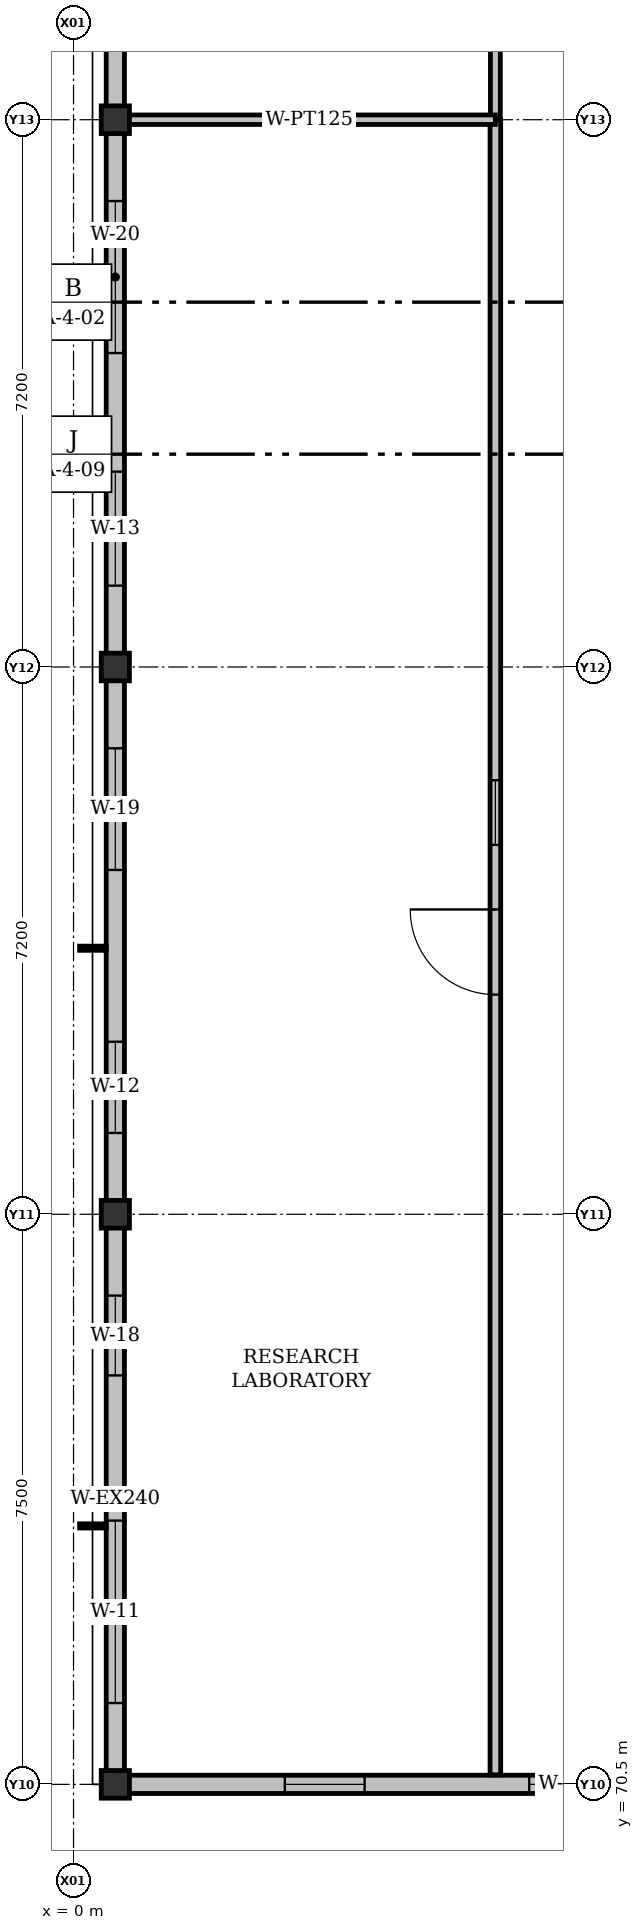
"""IFC4 building model, lengths in metres.
Left out: names, types, materials, properties, quantities, classifications, styles, units other than length and angle.
Written with IfcOpenShell. Run it as: python <this file> out.ifc"""

import sys

from ifc_helpers import new_model, si_unit, direction, frame, frame_2d, origin, origin_2d, place, context, subcontext, project, spatial, rectangle, i_section, extrude, element, fill, save


model = new_model("IFC4")
c1 = context("Model", 3, precision=1e-05, world=origin(), true_north=direction((0.0, 1.0)))
c2 = subcontext(c1, "Body", "Model", "MODEL_VIEW")
j1 = project(units=[si_unit("LENGTHUNIT", "METRE"), si_unit("PLANEANGLEUNIT", "RADIAN")], contexts=[c1])
p1 = place(None, origin())
s1 = spatial("IfcSite", under=j1, at=p1, CompositionType="ELEMENT")
p2 = place(p1, origin())
s2 = spatial("IfcBuilding", under=s1, at=p2, CompositionType="ELEMENT")
p3 = place(p2, frame((0.0, 0.0, 43.5)))
s3 = spatial("IfcBuildingStorey", under=s2, at=p3, CompositionType="ELEMENT", Elevation=43.5)
for number, where, z_axis, x_axis in (
    (1, (0.55, 70.5, 0.0), (0.0, 0.0, 1.0), (1.0, 0.0, 0.0)),
    (2, (0.55, 78.0, 0.0), (0.0, 0.0, 1.0), (1.0, 0.0, 0.0)),
    (3, (0.55, 85.2, 0.0), (0.0, 0.0, 1.0), (1.0, 0.0, 0.0)),
    (4, (0.55, 92.4, 0.0), (0.0, 0.0, 1.0), (1.0, 0.0, 0.0)),
):
    element("IfcColumn", number, at=place(p3, frame(where, z_axis=z_axis, x_axis=x_axis)), inside=s3, PredefinedType="COLUMN", context=c2, shape_type="SweptSolid", body=[
        extrude(i_section(OverallWidth=0.371, OverallDepth=0.364, WebThickness=0.013, FlangeThickness=0.022, FilletRadius=0.015, at=origin_2d()), origin(), (0.0, 0.0, 1.0), 4.2),
    ])
p4 = place(p3, frame((0.55, 70.5, 0.0), z_axis=(0.0, 0.0, 1.0), x_axis=(0.0, 1.0, 0.0)))
e5 = element("IfcWall", 5, at=p4, inside=s3, PredefinedType="SOLIDWALL", context=c2, shape_type="SweptSolid", body=[
    extrude(rectangle(XDim=7.5, YDim=0.24, at=frame_2d((3.75, 0.0))), origin(), (0.0, 0.0, 1.0), 3.552),
])
p5 = place(p4, frame((1.07, 0.0, 0.92)))
e6 = element("IfcOpeningElement", 6, at=p5, cuts=e5, PredefinedType="OPENING", context=c2, shape_type="SweptSolid", body=[
    extrude(rectangle(XDim=2.4, YDim=1.55, at=frame_2d((1.2, 0.775))), frame((0.0, 0.12, 0.0), z_axis=(0.0, -1.0, 0.0), x_axis=(1.0, 0.0, 0.0)), (0.0, 0.0, 1.0), 0.24),
])
p6 = place(p4, frame((5.38, 0.0, 0.92)))
e7 = element("IfcOpeningElement", 7, at=p6, cuts=e5, PredefinedType="OPENING", context=c2, shape_type="SweptSolid", body=[
    extrude(rectangle(XDim=1.05, YDim=1.3, at=frame_2d((0.525, 0.65))), frame((0.0, 0.12, 0.0), z_axis=(0.0, -1.0, 0.0), x_axis=(1.0, 0.0, 0.0)), (0.0, 0.0, 1.0), 0.24),
])
p7 = place(p3, frame((0.55, 78.0, 0.0), z_axis=(0.0, 0.0, 1.0), x_axis=(0.0, 1.0, 0.0)))
e8 = element("IfcWall", 8, at=p7, inside=s3, PredefinedType="SOLIDWALL", context=c2, shape_type="SweptSolid", body=[
    extrude(rectangle(XDim=7.2, YDim=0.24, at=frame_2d((3.6, 0.0))), origin(), (0.0, 0.0, 1.0), 3.552),
])
p8 = place(p7, frame((1.07, 0.0, 0.92)))
e9 = element("IfcOpeningElement", 9, at=p8, cuts=e8, PredefinedType="OPENING", context=c2, shape_type="SweptSolid", body=[
    extrude(rectangle(XDim=1.2, YDim=1.7, at=frame_2d((0.6, 0.85))), frame((0.0, 0.12, 0.0), z_axis=(0.0, -1.0, 0.0), x_axis=(1.0, 0.0, 0.0)), (0.0, 0.0, 1.0), 0.24),
])
p9 = place(p7, frame((4.53, 0.0, 0.92)))
e10 = element("IfcOpeningElement", 10, at=p9, cuts=e8, PredefinedType="OPENING", context=c2, shape_type="SweptSolid", body=[
    extrude(rectangle(XDim=1.6, YDim=1.35, at=frame_2d((0.8, 0.675))), frame((0.0, 0.12, 0.0), z_axis=(0.0, -1.0, 0.0), x_axis=(1.0, 0.0, 0.0)), (0.0, 0.0, 1.0), 0.24),
])
p10 = place(p3, frame((0.55, 85.2, 0.0), z_axis=(0.0, 0.0, 1.0), x_axis=(0.0, 1.0, 0.0)))
e11 = element("IfcWall", 11, at=p10, inside=s3, PredefinedType="SOLIDWALL", context=c2, shape_type="SweptSolid", body=[
    extrude(rectangle(XDim=7.2, YDim=0.24, at=frame_2d((3.6, 0.0))), origin(), (0.0, 0.0, 1.0), 3.552),
])
p11 = place(p10, frame((1.07, 0.0, 0.92)))
e12 = element("IfcOpeningElement", 12, at=p11, cuts=e11, PredefinedType="OPENING", context=c2, shape_type="SweptSolid", body=[
    extrude(rectangle(XDim=1.5, YDim=1.7, at=frame_2d((0.75, 0.85))), frame((0.0, 0.12, 0.0), z_axis=(0.0, -1.0, 0.0), x_axis=(1.0, 0.0, 0.0)), (0.0, 0.0, 1.0), 0.24),
])
p12 = place(p10, frame((4.13, 0.0, 0.92)))
e13 = element("IfcOpeningElement", 13, at=p12, cuts=e11, PredefinedType="OPENING", context=c2, shape_type="SweptSolid", body=[
    extrude(rectangle(XDim=2.0, YDim=1.35, at=frame_2d((1.0, 0.675))), frame((0.0, 0.12, 0.0), z_axis=(0.0, -1.0, 0.0), x_axis=(1.0, 0.0, 0.0)), (0.0, 0.0, 1.0), 0.24),
])
p13 = place(p3, frame((0.55, 92.4, 0.0), z_axis=(0.0, 0.0, 1.0), x_axis=(0.0, 1.0, 0.0)))
e14 = element("IfcWall", 14, at=p13, inside=s3, PredefinedType="SOLIDWALL", context=c2, shape_type="SweptSolid", body=[
    extrude(rectangle(XDim=7.2, YDim=0.24, at=frame_2d((3.6, 0.0))), origin(), (0.0, 0.0, 1.0), 3.552),
])
p14 = place(p13, frame((1.07, 0.0, 0.92)))
e15 = element("IfcOpeningElement", 15, at=p14, cuts=e14, PredefinedType="OPENING", context=c2, shape_type="SweptSolid", body=[
    extrude(rectangle(XDim=1.8, YDim=1.7, at=frame_2d((0.9, 0.85))), frame((0.0, 0.12, 0.0), z_axis=(0.0, -1.0, 0.0), x_axis=(1.0, 0.0, 0.0)), (0.0, 0.0, 1.0), 0.24),
])
p15 = place(p13, frame((4.93, 0.0, 0.92)))
e16 = element("IfcOpeningElement", 16, at=p15, cuts=e14, PredefinedType="OPENING", context=c2, shape_type="SweptSolid", body=[
    extrude(rectangle(XDim=1.2, YDim=1.4, at=frame_2d((0.6, 0.7))), frame((0.0, 0.12, 0.0), z_axis=(0.0, -1.0, 0.0), x_axis=(1.0, 0.0, 0.0)), (0.0, 0.0, 1.0), 0.24),
])
p16 = place(p3, frame((7.85, 70.5, 0.0), z_axis=(0.0, 0.0, 1.0), x_axis=(-1.0, 0.0, 0.0)))
e17 = element("IfcWall", 17, at=p16, inside=s3, PredefinedType="SOLIDWALL", context=c2, shape_type="SweptSolid", body=[
    extrude(rectangle(XDim=7.3, YDim=0.24, at=frame_2d((3.65, 0.0))), origin(), (0.0, 0.0, 1.0), 3.552),
])
p17 = place(p16, frame((0.955, 0.0, 0.92)))
e18 = element("IfcOpeningElement", 18, at=p17, cuts=e17, PredefinedType="OPENING", context=c2, shape_type="SweptSolid", body=[
    extrude(rectangle(XDim=0.9, YDim=1.3, at=frame_2d((0.45, 0.65))), frame((0.0, 0.12, 0.0), z_axis=(0.0, -1.0, 0.0), x_axis=(1.0, 0.0, 0.0)), (0.0, 0.0, 1.0), 0.24),
])
p18 = place(p16, frame((4.02, 0.0, 0.92)))
e19 = element("IfcOpeningElement", 19, at=p18, cuts=e17, PredefinedType="OPENING", context=c2, shape_type="SweptSolid", body=[
    extrude(rectangle(XDim=1.05, YDim=1.3, at=frame_2d((0.525, 0.65))), frame((0.0, 0.12, 0.0), z_axis=(0.0, -1.0, 0.0), x_axis=(1.0, 0.0, 0.0)), (0.0, 0.0, 1.0), 0.24),
])
p19 = place(p3, frame((5.55, 70.625, 0.0), z_axis=(0.0, 0.0, 1.0), x_axis=(0.0, 1.0, 0.0)))
e20 = element("IfcWall", 20, at=p19, inside=s3, PredefinedType="PARTITIONING", context=c2, shape_type="SweptSolid", body=[
    extrude(rectangle(XDim=21.775, YDim=0.14, at=frame_2d((10.887, 0.0))), origin(), (0.0, 0.0, 1.0), 3.426),
])
p20 = place(p19, frame((10.265, 0.0, 0.0)))
e21 = element("IfcOpeningElement", 21, at=p20, cuts=e20, PredefinedType="OPENING", context=c2, shape_type="SweptSolid", body=[
    extrude(rectangle(XDim=1.12, YDim=2.15, at=frame_2d((0.56, 1.075))), frame((0.0, 0.07, 0.0), z_axis=(0.0, -1.0, 0.0), x_axis=(1.0, 0.0, 0.0)), (0.0, 0.0, 1.0), 0.14),
])
p21 = place(p19, frame((12.235, 0.0, 0.92)))
e22 = element("IfcOpeningElement", 22, at=p21, cuts=e20, PredefinedType="OPENING", context=c2, shape_type="SweptSolid", body=[
    extrude(rectangle(XDim=0.85, YDim=1.1, at=frame_2d((0.425, 0.55))), frame((0.0, 0.07, 0.0), z_axis=(0.0, -1.0, 0.0), x_axis=(1.0, 0.0, 0.0)), (0.0, 0.0, 1.0), 0.14),
])
p22 = place(p3, frame((5.55, 92.4, 0.0), z_axis=(0.0, 0.0, 1.0), x_axis=(0.0, 1.0, 0.0)))
e23 = element("IfcWall", 23, at=p22, inside=s3, PredefinedType="PARTITIONING", context=c2, shape_type="SweptSolid", body=[
    extrude(rectangle(XDim=11.2, YDim=0.13, at=frame_2d((5.6, 0.0))), origin(), (0.0, 0.0, 1.0), 3.426),
])
p23 = place(p22, frame((5.125, 0.0, 0.0)))
e24 = element("IfcOpeningElement", 24, at=p23, cuts=e23, PredefinedType="OPENING", context=c2, shape_type="SweptSolid", body=[
    extrude(rectangle(XDim=0.95, YDim=2.2, at=frame_2d((0.475, 1.1))), frame((0.0, 0.065, 0.0), z_axis=(0.0, -1.0, 0.0), x_axis=(1.0, 0.0, 0.0)), (0.0, 0.0, 1.0), 0.13),
])
p24 = place(p22, frame((6.925, 0.0, 0.92)))
e25 = element("IfcOpeningElement", 25, at=p24, cuts=e23, PredefinedType="OPENING", context=c2, shape_type="SweptSolid", body=[
    extrude(rectangle(XDim=0.95, YDim=1.1, at=frame_2d((0.475, 0.55))), frame((0.0, 0.065, 0.0), z_axis=(0.0, -1.0, 0.0), x_axis=(1.0, 0.0, 0.0)), (0.0, 0.0, 1.0), 0.13),
])
p25 = place(p3, frame((0.65, 92.4, 0.0), z_axis=(0.0, 0.0, 1.0), x_axis=(1.0, 0.0, 0.0)))
e26 = element("IfcWall", 26, at=p25, inside=s3, PredefinedType="PARTITIONING", context=c2, shape_type="SweptSolid", body=[
    extrude(rectangle(XDim=4.9, YDim=0.125, at=frame_2d((2.45, 0.0))), origin(), (0.0, 0.0, 1.0), 3.426),
])
p26 = place(p5, origin())
e27 = element("IfcWindow", 27, at=p26, inside=s3, PartitioningType="DOUBLE_PANEL_VERTICAL", PredefinedType="WINDOW", context=c2, shape_type="SweptSolid", body=[
    extrude(rectangle(XDim=2.4, YDim=1.55, at=frame_2d((1.2, 0.775))), frame((0.0, 0.03, 0.0), z_axis=(0.0, -1.0, 0.0), x_axis=(1.0, 0.0, 0.0)), (0.0, 0.0, 1.0), 0.06),
])
fill(e6, e27)
p27 = place(p6, origin())
e28 = element("IfcWindow", 28, at=p27, inside=s3, PartitioningType="SINGLE_PANEL", PredefinedType="WINDOW", context=c2, shape_type="SweptSolid", body=[
    extrude(rectangle(XDim=1.05, YDim=1.3, at=frame_2d((0.525, 0.65))), frame((0.0, 0.03, 0.0), z_axis=(0.0, -1.0, 0.0), x_axis=(1.0, 0.0, 0.0)), (0.0, 0.0, 1.0), 0.06),
])
fill(e7, e28)
p28 = place(p8, origin())
e29 = element("IfcWindow", 29, at=p28, inside=s3, PartitioningType="SINGLE_PANEL", PredefinedType="WINDOW", context=c2, shape_type="SweptSolid", body=[
    extrude(rectangle(XDim=1.2, YDim=1.7, at=frame_2d((0.6, 0.85))), frame((0.0, 0.03, 0.0), z_axis=(0.0, -1.0, 0.0), x_axis=(1.0, 0.0, 0.0)), (0.0, 0.0, 1.0), 0.06),
])
fill(e9, e29)
p29 = place(p9, origin())
e30 = element("IfcWindow", 30, at=p29, inside=s3, PartitioningType="DOUBLE_PANEL_VERTICAL", PredefinedType="WINDOW", context=c2, shape_type="SweptSolid", body=[
    extrude(rectangle(XDim=1.6, YDim=1.35, at=frame_2d((0.8, 0.675))), frame((0.0, 0.03, 0.0), z_axis=(0.0, -1.0, 0.0), x_axis=(1.0, 0.0, 0.0)), (0.0, 0.0, 1.0), 0.06),
])
fill(e10, e30)
p30 = place(p11, origin())
e31 = element("IfcWindow", 31, at=p30, inside=s3, PartitioningType="SINGLE_PANEL", PredefinedType="WINDOW", context=c2, shape_type="SweptSolid", body=[
    extrude(rectangle(XDim=1.5, YDim=1.7, at=frame_2d((0.75, 0.85))), frame((0.0, 0.03, 0.0), z_axis=(0.0, -1.0, 0.0), x_axis=(1.0, 0.0, 0.0)), (0.0, 0.0, 1.0), 0.06),
])
fill(e12, e31)
p31 = place(p12, origin())
e32 = element("IfcWindow", 32, at=p31, inside=s3, PartitioningType="DOUBLE_PANEL_VERTICAL", PredefinedType="WINDOW", context=c2, shape_type="SweptSolid", body=[
    extrude(rectangle(XDim=2.0, YDim=1.35, at=frame_2d((1.0, 0.675))), frame((0.0, 0.03, 0.0), z_axis=(0.0, -1.0, 0.0), x_axis=(1.0, 0.0, 0.0)), (0.0, 0.0, 1.0), 0.06),
])
fill(e13, e32)
p32 = place(p17, origin())
e33 = element("IfcWindow", 33, at=p32, inside=s3, PartitioningType="SINGLE_PANEL", PredefinedType="WINDOW", context=c2, shape_type="SweptSolid", body=[
    extrude(rectangle(XDim=0.9, YDim=1.3, at=frame_2d((0.45, 0.65))), frame((0.0, 0.03, 0.0), z_axis=(0.0, -1.0, 0.0), x_axis=(1.0, 0.0, 0.0)), (0.0, 0.0, 1.0), 0.06),
])
fill(e18, e33)
p33 = place(p18, origin())
e34 = element("IfcWindow", 34, at=p33, inside=s3, PartitioningType="SINGLE_PANEL", PredefinedType="WINDOW", context=c2, shape_type="SweptSolid", body=[
    extrude(rectangle(XDim=1.05, YDim=1.3, at=frame_2d((0.525, 0.65))), frame((0.0, 0.03, 0.0), z_axis=(0.0, -1.0, 0.0), x_axis=(1.0, 0.0, 0.0)), (0.0, 0.0, 1.0), 0.06),
])
fill(e19, e34)
p34 = place(p20, origin())
e35 = element("IfcDoor", 35, at=p34, inside=s3, OperationType="SINGLE_SWING_RIGHT", PredefinedType="DOOR", context=c2, shape_type="SweptSolid", body=[
    extrude(rectangle(XDim=1.12, YDim=2.15, at=frame_2d((0.56, 1.075))), frame((0.0, 0.025, 0.0), z_axis=(0.0, -1.0, 0.0), x_axis=(1.0, 0.0, 0.0)), (0.0, 0.0, 1.0), 0.05),
])
fill(e21, e35)
p35 = place(p21, origin())
e36 = element("IfcWindow", 36, at=p35, inside=s3, PartitioningType="SINGLE_PANEL", PredefinedType="WINDOW", context=c2, shape_type="SweptSolid", body=[
    extrude(rectangle(XDim=0.85, YDim=1.1, at=frame_2d((0.425, 0.55))), frame((0.0, 0.03, 0.0), z_axis=(0.0, -1.0, 0.0), x_axis=(1.0, 0.0, 0.0)), (0.0, 0.0, 1.0), 0.06),
])
fill(e22, e36)
save(model, sys.argv[1])
